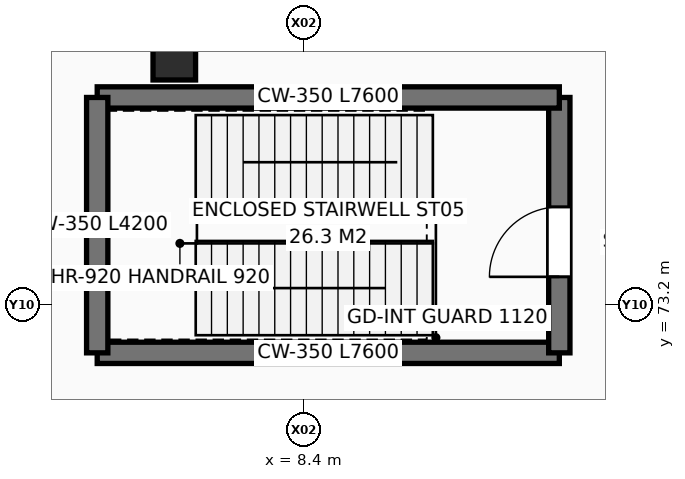
"""IFC4 building model, lengths in metres.
Left out: names, types, materials, properties, quantities, classifications, styles, units other than length and angle.
Written with IfcOpenShell. Run it as: python <this file> out.ifc"""

import sys

from ifc_helpers import new_model, si_unit, direction, frame, frame_2d, origin, origin_2d, place, context, subcontext, project, spatial, rectangle, circle, extrude, element, fill, save


model = new_model("IFC4")
c1 = context("Model", 3, precision=1e-05, world=origin(), true_north=direction((0.0, 1.0)))
c2 = subcontext(c1, "Body", "Model", "MODEL_VIEW")
j1 = project(units=[si_unit("LENGTHUNIT", "METRE"), si_unit("PLANEANGLEUNIT", "RADIAN")], contexts=[c1])
p1 = place(None, origin())
s1 = spatial("IfcSite", under=j1, at=p1, CompositionType="ELEMENT")
p2 = place(p1, origin())
s2 = spatial("IfcBuilding", under=s1, at=p2, CompositionType="ELEMENT")
p3 = place(p2, origin())
s3 = spatial("IfcBuildingStorey", under=s2, at=p3, CompositionType="ELEMENT", Elevation=0.0)
p4 = place(p3, frame((6.268, 77.237, 0.0), z_axis=(0.0, 0.0, 1.0), x_axis=(1.0, 0.0, 0.0)))
e1 = element("IfcColumn", 1, at=p4, inside=s3, PredefinedType="COLUMN", context=c2, shape_type="SweptSolid", body=[
    extrude(circle(Radius=0.35, at=origin_2d()), origin(), (0.0, 0.0, 1.0), 5.4),
])
p5 = place(p3, frame((3.233, 72.002, 0.0), z_axis=(0.0, 0.0, 1.0), x_axis=(0.707085031082, -0.707128530622, 0.0)))
e2 = element("IfcWall", 2, at=p5, inside=s3, PredefinedType="SOLIDWALL", context=c2, shape_type="SweptSolid", body=[
    extrude(rectangle(XDim=5.613, YDim=0.38, at=frame_2d((2.806, 0.0))), origin(), (0.0, 0.0, 1.0), 4.33),
])
p6 = place(p5, frame((2.056, 0.0, 0.9)))
e3 = element("IfcOpeningElement", 3, at=p6, cuts=e2, PredefinedType="OPENING", context=c2, shape_type="SweptSolid", body=[
    extrude(rectangle(XDim=1.5, YDim=2.1, at=frame_2d((0.75, 1.05))), frame((0.0, 0.2, 0.0), z_axis=(0.0, -1.0, 0.0), x_axis=(1.0, 0.0, 0.0)), (0.0, 0.0, 1.0), 0.4),
])
p7 = place(p3, frame((5.0, 72.4, 0.0), z_axis=(0.0, 0.0, 1.0), x_axis=(1.0, 0.0, 0.0)))
e4 = element("IfcWall", 4, at=p7, inside=s3, PredefinedType="SHEAR", context=c2, shape_type="SweptSolid", body=[
    extrude(rectangle(XDim=7.6, YDim=0.35, at=frame_2d((3.8, 0.0))), origin(), (0.0, 0.0, 1.0), 5.12),
])
p8 = place(p3, frame((12.6, 72.4, 0.0), z_axis=(0.0, 0.0, 1.0), x_axis=(0.0, 1.0, 0.0)))
e5 = element("IfcWall", 5, at=p8, inside=s3, PredefinedType="SHEAR", context=c2, shape_type="SweptSolid", body=[
    extrude(rectangle(XDim=4.2, YDim=0.35, at=frame_2d((2.1, 0.0))), origin(), (0.0, 0.0, 1.0), 5.12),
])
p9 = place(p8, frame((1.25, 0.0, 0.0)))
e6 = element("IfcOpeningElement", 6, at=p9, cuts=e5, PredefinedType="OPENING", context=c2, shape_type="SweptSolid", body=[
    extrude(rectangle(XDim=1.15, YDim=2.2, at=frame_2d((0.575, 1.1))), frame((0.0, 0.185, 0.0), z_axis=(0.0, -1.0, 0.0), x_axis=(1.0, 0.0, 0.0)), (0.0, 0.0, 1.0), 0.37),
])
p10 = place(p3, frame((12.6, 76.6, 0.0), z_axis=(0.0, 0.0, 1.0), x_axis=(-1.0, 0.0, 0.0)))
e7 = element("IfcWall", 7, at=p10, inside=s3, PredefinedType="SHEAR", context=c2, shape_type="SweptSolid", body=[
    extrude(rectangle(XDim=7.6, YDim=0.35, at=frame_2d((3.8, 0.0))), origin(), (0.0, 0.0, 1.0), 5.12),
])
p11 = place(p3, frame((5.0, 76.6, 0.0), z_axis=(0.0, 0.0, 1.0), x_axis=(0.0, -1.0, 0.0)))
e8 = element("IfcWall", 8, at=p11, inside=s3, PredefinedType="SHEAR", context=c2, shape_type="SweptSolid", body=[
    extrude(rectangle(XDim=4.2, YDim=0.35, at=frame_2d((2.1, 0.0))), origin(), (0.0, 0.0, 1.0), 5.12),
])
p12 = place(p9, frame((1.15, 0.0, 0.0), z_axis=(0.0, 0.0, 1.0), x_axis=(-1.0, 0.0, 0.0)))
e9 = element("IfcDoor", 9, at=p12, inside=s3, OperationType="SINGLE_SWING_LEFT", PredefinedType="DOOR", context=c2, shape_type="SweptSolid", body=[
    extrude(rectangle(XDim=1.15, YDim=2.2, at=frame_2d((0.575, 1.1))), frame((0.0, 0.025, 0.0), z_axis=(0.0, -1.0, 0.0), x_axis=(1.0, 0.0, 0.0)), (0.0, 0.0, 1.0), 0.05),
])
fill(e6, e9)
save(model, sys.argv[1])
